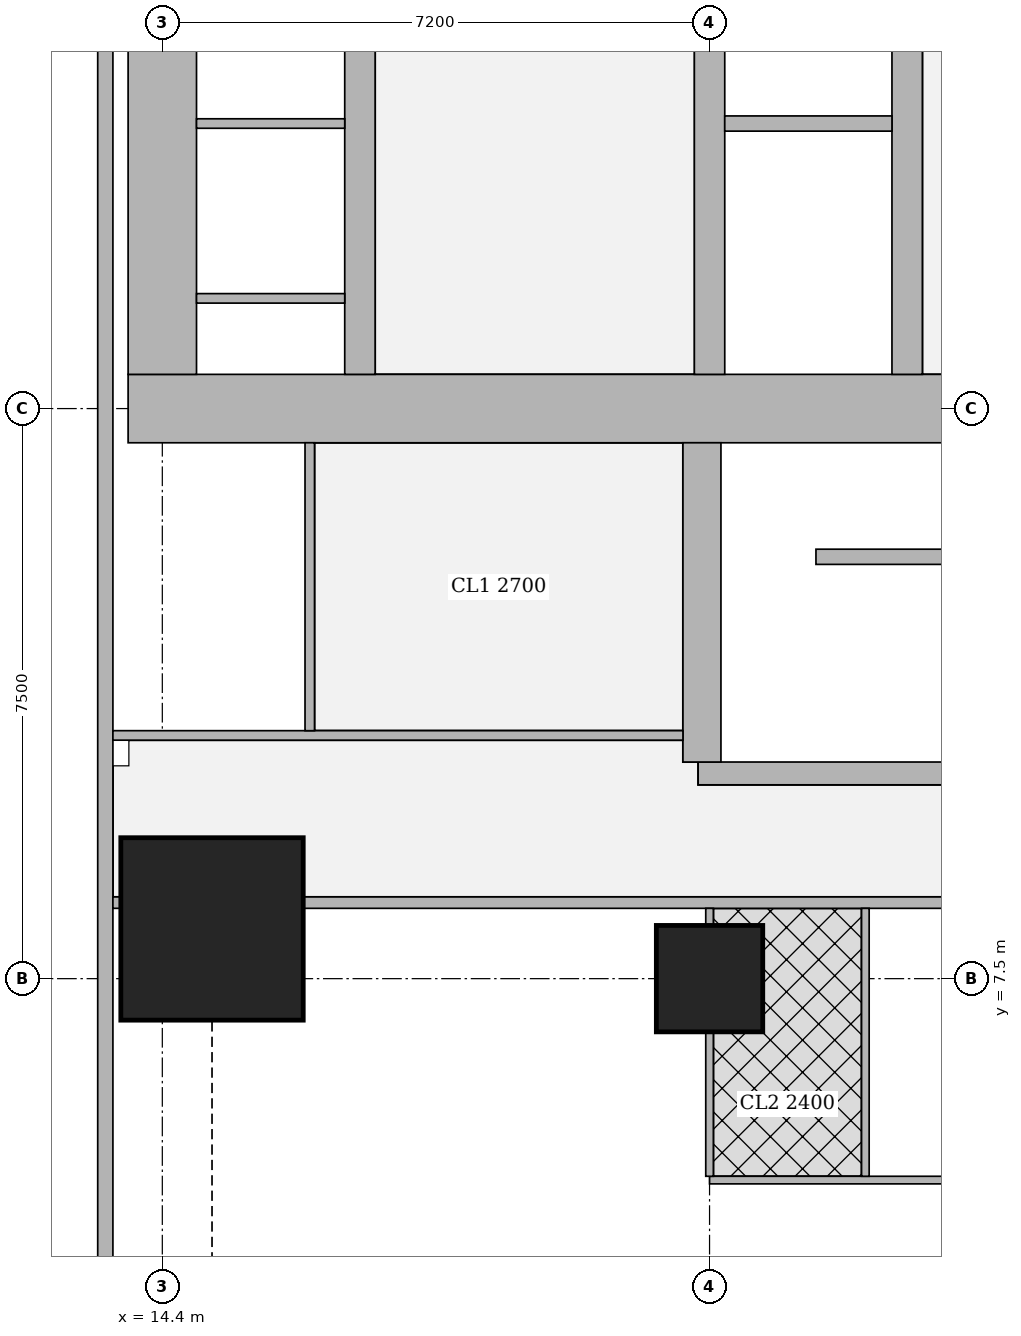
"""IFC4 building model, lengths in metres.
Left out: names, types, materials, properties, quantities, classifications, styles, units other than length and angle.
Written with IfcOpenShell. Run it as: python <this file> out.ifc"""

import sys

from ifc_helpers import new_model, si_unit, direction, frame, frame_2d, origin, origin_2d, place, context, subcontext, project, spatial, rectangle, extrude, element, fill, save


model = new_model("IFC4")
c1 = context("Model", 3, precision=1e-05, world=origin(), true_north=direction((0.0, 1.0)))
c2 = subcontext(c1, "Body", "Model", "MODEL_VIEW")
j1 = project(units=[si_unit("LENGTHUNIT", "METRE"), si_unit("PLANEANGLEUNIT", "RADIAN")], contexts=[c1])
p1 = place(None, origin())
s1 = spatial("IfcSite", under=j1, at=p1, CompositionType="ELEMENT")
p2 = place(p1, origin())
s2 = spatial("IfcBuilding", under=s1, at=p2, CompositionType="ELEMENT")
p3 = place(p2, frame((0.0, 0.0, 223.7)))
s3 = spatial("IfcBuildingStorey", under=s2, at=p3, CompositionType="ELEMENT", Elevation=223.7)
p4 = place(p3, frame((15.054, 8.154, 0.0), z_axis=(0.0, 0.0, 1.0), x_axis=(1.0, 0.0, 0.0)))
e1 = element("IfcColumn", 1, at=p4, inside=s3, PredefinedType="COLUMN", context=c2, shape_type="SweptSolid", body=[
    extrude(rectangle(XDim=2.4, YDim=2.4, at=origin_2d()), origin(), (0.0, 0.0, 1.0), 3.75),
])
p5 = place(p3, frame((21.6, 7.5, 0.0), z_axis=(0.0, 0.0, 1.0), x_axis=(1.0, 0.0, 0.0)))
e2 = element("IfcColumn", 2, at=p5, inside=s3, PredefinedType="COLUMN", context=c2, shape_type="SweptSolid", body=[
    extrude(rectangle(XDim=1.4, YDim=1.4, at=origin_2d()), origin(), (0.0, 0.0, 1.0), 3.75),
])
p6 = place(p3, frame((13.95, 15.0, 0.0), z_axis=(0.0, 0.0, 1.0), x_axis=(1.0, 0.0, 0.0)))
e3 = element("IfcWall", 3, at=p6, inside=s3, PredefinedType="SHEAR", context=c2, shape_type="SweptSolid", body=[
    extrude(rectangle(XDim=15.3, YDim=0.9, at=frame_2d((7.65, 0.0))), origin(), (0.0, 0.0, 1.0), 3.75),
])
p7 = place(p6, frame((4.45, 0.0, 0.0)))
e4 = element("IfcOpeningElement", 4, at=p7, cuts=e3, PredefinedType="OPENING", context=c2, shape_type="SweptSolid", body=[
    extrude(rectangle(XDim=1.8, YDim=2.1, at=frame_2d((0.9, 1.05))), frame((0.0, 0.46, 0.0), z_axis=(0.0, -1.0, 0.0), x_axis=(1.0, 0.0, 0.0)), (0.0, 0.0, 1.0), 0.92),
])
p8 = place(p6, frame((10.7, 0.0, 0.0)))
e5 = element("IfcOpeningElement", 5, at=p8, cuts=e3, PredefinedType="OPENING", context=c2, shape_type="SweptSolid", body=[
    extrude(rectangle(XDim=1.1, YDim=2.1, at=frame_2d((0.55, 1.05))), frame((0.0, 0.46, 0.0), z_axis=(0.0, -1.0, 0.0), x_axis=(1.0, 0.0, 0.0)), (0.0, 0.0, 1.0), 0.92),
])
p9 = place(p3, frame((14.4, 15.45, 0.0), z_axis=(0.0, 0.0, 1.0), x_axis=(0.0, 1.0, 0.0)))
e6 = element("IfcWall", 6, at=p9, inside=s3, PredefinedType="SHEAR", context=c2, shape_type="SweptSolid", body=[
    extrude(rectangle(XDim=14.1, YDim=0.9, at=frame_2d((7.05, 0.0))), origin(), (0.0, 0.0, 1.0), 3.75),
])
p10 = place(p3, frame((17.0, 15.45, 0.0), z_axis=(0.0, 0.0, 1.0), x_axis=(0.0, 1.0, 0.0)))
e7 = element("IfcWall", 7, at=p10, inside=s3, PredefinedType="SHEAR", context=c2, shape_type="SweptSolid", body=[
    extrude(rectangle(XDim=14.1, YDim=0.4, at=frame_2d((7.05, 0.0))), origin(), (0.0, 0.0, 1.0), 3.75),
])
p11 = place(p10, frame((1.05, 0.0, 0.0)))
e8 = element("IfcOpeningElement", 8, at=p11, cuts=e7, PredefinedType="OPENING", context=c2, shape_type="SweptSolid", body=[
    extrude(rectangle(XDim=1.0, YDim=2.1, at=frame_2d((0.5, 1.05))), frame((0.0, 0.21, 0.0), z_axis=(0.0, -1.0, 0.0), x_axis=(1.0, 0.0, 0.0)), (0.0, 0.0, 1.0), 0.42),
])
p12 = place(p10, frame((4.675, 0.0, 0.0)))
e9 = element("IfcOpeningElement", 9, at=p12, cuts=e7, PredefinedType="OPENING", context=c2, shape_type="SweptSolid", body=[
    extrude(rectangle(XDim=1.0, YDim=2.1, at=frame_2d((0.5, 1.05))), frame((0.0, 0.21, 0.0), z_axis=(0.0, -1.0, 0.0), x_axis=(1.0, 0.0, 0.0)), (0.0, 0.0, 1.0), 0.42),
])
p13 = place(p10, frame((8.425, 0.0, 0.0)))
e10 = element("IfcOpeningElement", 10, at=p13, cuts=e7, PredefinedType="OPENING", context=c2, shape_type="SweptSolid", body=[
    extrude(rectangle(XDim=1.0, YDim=2.1, at=frame_2d((0.5, 1.05))), frame((0.0, 0.21, 0.0), z_axis=(0.0, -1.0, 0.0), x_axis=(1.0, 0.0, 0.0)), (0.0, 0.0, 1.0), 0.42),
])
p14 = place(p10, frame((12.175, 0.0, 0.0)))
e11 = element("IfcOpeningElement", 11, at=p14, cuts=e7, PredefinedType="OPENING", context=c2, shape_type="SweptSolid", body=[
    extrude(rectangle(XDim=1.0, YDim=2.1, at=frame_2d((0.5, 1.05))), frame((0.0, 0.21, 0.0), z_axis=(0.0, -1.0, 0.0), x_axis=(1.0, 0.0, 0.0)), (0.0, 0.0, 1.0), 0.42),
])
p15 = place(p3, frame((21.6, 15.45, 0.0), z_axis=(0.0, 0.0, 1.0), x_axis=(0.0, 1.0, 0.0)))
e12 = element("IfcWall", 12, at=p15, inside=s3, PredefinedType="SHEAR", context=c2, shape_type="SweptSolid", body=[
    extrude(rectangle(XDim=14.1, YDim=0.4, at=frame_2d((7.05, 0.0))), origin(), (0.0, 0.0, 1.0), 3.75),
])
p16 = place(p15, frame((0.875, 0.0, 0.0)))
e13 = element("IfcOpeningElement", 13, at=p16, cuts=e12, PredefinedType="OPENING", context=c2, shape_type="SweptSolid", body=[
    extrude(rectangle(XDim=1.1, YDim=2.1, at=frame_2d((0.55, 1.05))), frame((0.0, 0.21, 0.0), z_axis=(0.0, -1.0, 0.0), x_axis=(1.0, 0.0, 0.0)), (0.0, 0.0, 1.0), 0.42),
])
p17 = place(p15, frame((4.625, 0.0, 0.0)))
e14 = element("IfcOpeningElement", 14, at=p17, cuts=e12, PredefinedType="OPENING", context=c2, shape_type="SweptSolid", body=[
    extrude(rectangle(XDim=1.1, YDim=2.1, at=frame_2d((0.55, 1.05))), frame((0.0, 0.21, 0.0), z_axis=(0.0, -1.0, 0.0), x_axis=(1.0, 0.0, 0.0)), (0.0, 0.0, 1.0), 0.42),
])
p18 = place(p15, frame((8.375, 0.0, 0.0)))
e15 = element("IfcOpeningElement", 15, at=p18, cuts=e12, PredefinedType="OPENING", context=c2, shape_type="SweptSolid", body=[
    extrude(rectangle(XDim=1.1, YDim=2.1, at=frame_2d((0.55, 1.05))), frame((0.0, 0.21, 0.0), z_axis=(0.0, -1.0, 0.0), x_axis=(1.0, 0.0, 0.0)), (0.0, 0.0, 1.0), 0.42),
])
p19 = place(p15, frame((12.125, 0.0, 0.0)))
e16 = element("IfcOpeningElement", 16, at=p19, cuts=e12, PredefinedType="OPENING", context=c2, shape_type="SweptSolid", body=[
    extrude(rectangle(XDim=1.1, YDim=2.1, at=frame_2d((0.55, 1.05))), frame((0.0, 0.21, 0.0), z_axis=(0.0, -1.0, 0.0), x_axis=(1.0, 0.0, 0.0)), (0.0, 0.0, 1.0), 0.42),
])
p20 = place(p3, frame((24.2, 15.45, 0.0), z_axis=(0.0, 0.0, 1.0), x_axis=(0.0, 1.0, 0.0)))
e17 = element("IfcWall", 17, at=p20, inside=s3, PredefinedType="SHEAR", context=c2, shape_type="SweptSolid", body=[
    extrude(rectangle(XDim=14.1, YDim=0.4, at=frame_2d((7.05, 0.0))), origin(), (0.0, 0.0, 1.0), 3.75),
])
p21 = place(p3, frame((21.45, 10.2, 0.0), z_axis=(0.0, 0.0, 1.0), x_axis=(1.0, 0.0, 0.0)))
e18 = element("IfcWall", 18, at=p21, inside=s3, PredefinedType="SHEAR", context=c2, shape_type="SweptSolid", body=[
    extrude(rectangle(XDim=7.5, YDim=0.3, at=frame_2d((3.75, 0.0))), origin(), (0.0, 0.0, 1.0), 3.75),
])
p22 = place(p21, frame((0.5, 0.0, 0.0)))
e19 = element("IfcOpeningElement", 19, at=p22, cuts=e18, PredefinedType="OPENING", context=c2, shape_type="SweptSolid", body=[
    extrude(rectangle(XDim=1.1, YDim=2.1, at=frame_2d((0.55, 1.05))), frame((0.0, 0.16, 0.0), z_axis=(0.0, -1.0, 0.0), x_axis=(1.0, 0.0, 0.0)), (0.0, 0.0, 1.0), 0.32),
])
p23 = place(p3, frame((21.5, 10.35, 0.0), z_axis=(0.0, 0.0, 1.0), x_axis=(0.0, 1.0, 0.0)))
e20 = element("IfcWall", 20, at=p23, inside=s3, PredefinedType="SHEAR", context=c2, shape_type="SweptSolid", body=[
    extrude(rectangle(XDim=4.2, YDim=0.5, at=frame_2d((2.1, 0.0))), origin(), (0.0, 0.0, 1.0), 3.75),
])
p24 = place(p3, frame((13.65, 44.837, 0.0), z_axis=(0.0, 0.0, 1.0), x_axis=(0.0, -1.0, 0.0)))
e21 = element("IfcWall", 21, at=p24, inside=s3, PredefinedType="SOLIDWALL", context=c2, shape_type="SweptSolid", body=[
    extrude(rectangle(XDim=44.674, YDim=0.2, at=frame_2d((22.337, 0.0))), origin(), (0.0, 0.0, 1.0), 3.5),
])
p25 = place(p24, frame((2.614, 0.0, 0.9)))
e22 = element("IfcOpeningElement", 22, at=p25, cuts=e21, PredefinedType="OPENING", context=c2, shape_type="SweptSolid", body=[
    extrude(rectangle(XDim=2.4, YDim=1.5, at=frame_2d((1.2, 0.75))), frame((0.0, 0.11, 0.0), z_axis=(0.0, -1.0, 0.0), x_axis=(1.0, 0.0, 0.0)), (0.0, 0.0, 1.0), 0.22),
])
p26 = place(p24, frame((39.333, 0.0, 0.9)))
e23 = element("IfcOpeningElement", 23, at=p26, cuts=e21, PredefinedType="OPENING", context=c2, shape_type="SweptSolid", body=[
    extrude(rectangle(XDim=2.4, YDim=1.5, at=frame_2d((1.2, 0.75))), frame((0.0, 0.11, 0.0), z_axis=(0.0, -1.0, 0.0), x_axis=(1.0, 0.0, 0.0)), (0.0, 0.0, 1.0), 0.22),
])
p27 = place(p24, frame((33.087, 0.0, 0.0)))
e24 = element("IfcOpeningElement", 24, at=p27, cuts=e21, PredefinedType="OPENING", context=c2, shape_type="SweptSolid", body=[
    extrude(rectangle(XDim=1.0, YDim=2.4, at=frame_2d((0.5, 1.2))), frame((0.0, 0.11, 0.0), z_axis=(0.0, -1.0, 0.0), x_axis=(1.0, 0.0, 0.0)), (0.0, 0.0, 1.0), 0.22),
])
p28 = place(p24, frame((10.587, 0.0, 0.0)))
e25 = element("IfcOpeningElement", 25, at=p28, cuts=e21, PredefinedType="OPENING", context=c2, shape_type="SweptSolid", body=[
    extrude(rectangle(XDim=1.0, YDim=2.4, at=frame_2d((0.5, 1.2))), frame((0.0, 0.11, 0.0), z_axis=(0.0, -1.0, 0.0), x_axis=(1.0, 0.0, 0.0)), (0.0, 0.0, 1.0), 0.22),
])
p29 = place(p3, frame((40.053, 8.5, 0.0), z_axis=(0.0, 0.0, 1.0), x_axis=(-1.0, 0.0, 0.0)))
e26 = element("IfcWall", 26, at=p29, inside=s3, PredefinedType="SOLIDWALL", context=c2, shape_type="SweptSolid", body=[
    extrude(rectangle(XDim=23.798, YDim=0.15, at=frame_2d((11.899, 0.0))), origin(), (0.0, 0.0, 1.0), 3.5),
])
p30 = place(p29, frame((21.978, 0.0, 0.0)))
e27 = element("IfcOpeningElement", 27, at=p30, cuts=e26, PredefinedType="OPENING", context=c2, shape_type="SweptSolid", body=[
    extrude(rectangle(XDim=1.0, YDim=2.1, at=frame_2d((0.5, 1.05))), frame((0.0, 0.085, 0.0), z_axis=(0.0, -1.0, 0.0), x_axis=(1.0, 0.0, 0.0)), (0.0, 0.0, 1.0), 0.17),
])
p31 = place(p29, frame((12.753, 0.0, 0.0)))
e28 = element("IfcOpeningElement", 28, at=p31, cuts=e26, PredefinedType="OPENING", context=c2, shape_type="SweptSolid", body=[
    extrude(rectangle(XDim=1.0, YDim=2.1, at=frame_2d((0.5, 1.05))), frame((0.0, 0.085, 0.0), z_axis=(0.0, -1.0, 0.0), x_axis=(1.0, 0.0, 0.0)), (0.0, 0.0, 1.0), 0.17),
])
p32 = place(p29, frame((0.15, 0.0, 0.0)))
e29 = element("IfcOpeningElement", 29, at=p32, cuts=e26, PredefinedType="OPENING", context=c2, shape_type="SweptSolid", body=[
    extrude(rectangle(XDim=1.0, YDim=2.1, at=frame_2d((0.5, 1.05))), frame((0.0, 0.085, 0.0), z_axis=(0.0, -1.0, 0.0), x_axis=(1.0, 0.0, 0.0)), (0.0, 0.0, 1.0), 0.17),
])
p33 = place(p3, frame((13.853, 8.5, 0.0), z_axis=(0.0, 0.0, 1.0), x_axis=(-1.0, 0.0, 0.0)))
e30 = element("IfcWall", 30, at=p33, inside=s3, PredefinedType="SOLIDWALL", context=c2, shape_type="SweptSolid", body=[
    extrude(rectangle(XDim=0.103, YDim=0.15, at=frame_2d((0.052, 0.0))), origin(), (0.0, 0.0, 1.0), 3.5),
])
p34 = place(p3, frame((25.075, 4.85, 0.0), z_axis=(0.0, 0.0, 1.0), x_axis=(-1.0, 0.0, 0.0)))
e31 = element("IfcWall", 31, at=p34, inside=s3, PredefinedType="PARTITIONING", context=c2, shape_type="SweptSolid", body=[
    extrude(rectangle(XDim=3.475, YDim=0.1, at=frame_2d((1.737, 0.0))), origin(), (0.0, 0.0, 1.0), 3.5),
])
p35 = place(p34, frame((2.0, 0.0, 0.0)))
e32 = element("IfcOpeningElement", 32, at=p35, cuts=e31, PredefinedType="OPENING", context=c2, shape_type="SweptSolid", body=[
    extrude(rectangle(XDim=0.9, YDim=2.1, at=frame_2d((0.45, 1.05))), frame((0.0, 0.06, 0.0), z_axis=(0.0, -1.0, 0.0), x_axis=(1.0, 0.0, 0.0)), (0.0, 0.0, 1.0), 0.12),
])
p36 = place(p34, frame((0.2, 0.0, 0.0)))
e33 = element("IfcOpeningElement", 33, at=p36, cuts=e31, PredefinedType="OPENING", context=c2, shape_type="SweptSolid", body=[
    extrude(rectangle(XDim=0.9, YDim=2.1, at=frame_2d((0.45, 1.05))), frame((0.0, 0.06, 0.0), z_axis=(0.0, -1.0, 0.0), x_axis=(1.0, 0.0, 0.0)), (0.0, 0.0, 1.0), 0.12),
])
p37 = place(p3, frame((21.6, 4.9, 0.0), z_axis=(0.0, 0.0, 1.0), x_axis=(0.0, 1.0, 0.0)))
e34 = element("IfcWall", 34, at=p37, inside=s3, PredefinedType="PARTITIONING", context=c2, shape_type="SweptSolid", body=[
    extrude(rectangle(XDim=1.899, YDim=0.1, at=frame_2d((0.95, 0.0))), origin(), (0.0, 0.0, 1.0), 3.5),
])
p38 = place(p3, frame((21.6, 8.201, 0.0), z_axis=(0.0, 0.0, 1.0), x_axis=(0.0, 1.0, 0.0)))
e35 = element("IfcWall", 35, at=p38, inside=s3, PredefinedType="PARTITIONING", context=c2, shape_type="SweptSolid", body=[
    extrude(rectangle(XDim=0.224, YDim=0.1, at=frame_2d((0.112, 0.0))), origin(), (0.0, 0.0, 1.0), 3.5),
])
p39 = place(p3, frame((23.65, 4.9, 0.0), z_axis=(0.0, 0.0, 1.0), x_axis=(0.0, 1.0, 0.0)))
e36 = element("IfcWall", 36, at=p39, inside=s3, PredefinedType="PARTITIONING", context=c2, shape_type="SweptSolid", body=[
    extrude(rectangle(XDim=3.525, YDim=0.1, at=frame_2d((1.763, 0.0))), origin(), (0.0, 0.0, 1.0), 3.5),
])
p40 = place(p3, frame((13.75, 10.7, 0.0), z_axis=(0.0, 0.0, 1.0), x_axis=(1.0, 0.0, 0.0)))
e37 = element("IfcWall", 37, at=p40, inside=s3, PredefinedType="PARTITIONING", context=c2, shape_type="SweptSolid", body=[
    extrude(rectangle(XDim=7.5, YDim=0.125, at=frame_2d((3.75, 0.0))), origin(), (0.0, 0.0, 1.0), 3.5),
])
p41 = place(p40, frame((4.245, 0.0, 0.0)))
e38 = element("IfcOpeningElement", 38, at=p41, cuts=e37, PredefinedType="OPENING", context=c2, shape_type="SweptSolid", body=[
    extrude(rectangle(XDim=1.8, YDim=2.1, at=frame_2d((0.9, 1.05))), frame((0.0, 0.073, 0.0), z_axis=(0.0, -1.0, 0.0), x_axis=(1.0, 0.0, 0.0)), (0.0, 0.0, 1.0), 0.145),
])
p42 = place(p3, frame((16.34, 10.762, 0.0), z_axis=(0.0, 0.0, 1.0), x_axis=(0.0, 1.0, 0.0)))
e39 = element("IfcWall", 39, at=p42, inside=s3, PredefinedType="PARTITIONING", context=c2, shape_type="SweptSolid", body=[
    extrude(rectangle(XDim=3.788, YDim=0.125, at=frame_2d((1.894, 0.0))), origin(), (0.0, 0.0, 1.0), 3.5),
])
p43 = place(p42, frame((1.338, 0.0, 0.0)))
e40 = element("IfcOpeningElement", 40, at=p43, cuts=e39, PredefinedType="OPENING", context=c2, shape_type="SweptSolid", body=[
    extrude(rectangle(XDim=1.0, YDim=2.1, at=frame_2d((0.5, 1.05))), frame((0.0, 0.073, 0.0), z_axis=(0.0, -1.0, 0.0), x_axis=(1.0, 0.0, 0.0)), (0.0, 0.0, 1.0), 0.145),
])
p44 = place(p3, frame((14.85, 16.45, 0.0), z_axis=(0.0, 0.0, 1.0), x_axis=(1.0, 0.0, 0.0)))
e41 = element("IfcWall", 41, at=p44, inside=s3, PredefinedType="PARTITIONING", context=c2, shape_type="SweptSolid", body=[
    extrude(rectangle(XDim=1.95, YDim=0.125, at=frame_2d((0.975, 0.0))), origin(), (0.0, 0.0, 1.0), 3.5),
])
p45 = place(p44, frame((0.2, 0.0, 0.0)))
e42 = element("IfcOpeningElement", 42, at=p45, cuts=e41, PredefinedType="OPENING", context=c2, shape_type="SweptSolid", body=[
    extrude(rectangle(XDim=1.0, YDim=2.1, at=frame_2d((0.5, 1.05))), frame((0.0, 0.073, 0.0), z_axis=(0.0, -1.0, 0.0), x_axis=(1.0, 0.0, 0.0)), (0.0, 0.0, 1.0), 0.145),
])
p46 = place(p3, frame((14.85, 18.75, 0.0), z_axis=(0.0, 0.0, 1.0), x_axis=(1.0, 0.0, 0.0)))
e43 = element("IfcWall", 43, at=p46, inside=s3, PredefinedType="PARTITIONING", context=c2, shape_type="SweptSolid", body=[
    extrude(rectangle(XDim=1.95, YDim=0.125, at=frame_2d((0.975, 0.0))), origin(), (0.0, 0.0, 1.0), 3.5),
])
p47 = place(p3, frame((23.0, 13.05, 0.0), z_axis=(0.0, 0.0, 1.0), x_axis=(1.0, 0.0, 0.0)))
e44 = element("IfcWall", 44, at=p47, inside=s3, PredefinedType="SHEAR", context=c2, shape_type="SweptSolid", body=[
    extrude(rectangle(XDim=5.8, YDim=0.2, at=frame_2d((2.9, 0.0))), origin(), (0.0, 0.0, 1.0), 3.75),
])
p48 = place(p3, frame((21.8, 18.75, 0.0), z_axis=(0.0, 0.0, 1.0), x_axis=(1.0, 0.0, 0.0)))
e45 = element("IfcWall", 45, at=p48, inside=s3, PredefinedType="SOLIDWALL", context=c2, shape_type="SweptSolid", body=[
    extrude(rectangle(XDim=2.2, YDim=0.2, at=frame_2d((1.1, 0.0))), origin(), (0.0, 0.0, 1.0), 3.5),
])
p49 = place(p26, origin())
e46 = element("IfcWindow", 46, at=p49, inside=s3, PartitioningType="SINGLE_PANEL", PredefinedType="WINDOW", context=c2, shape_type="SweptSolid", body=[
    extrude(rectangle(XDim=2.4, YDim=1.5, at=frame_2d((1.2, 0.75))), frame((0.0, 0.03, 0.0), z_axis=(0.0, -1.0, 0.0), x_axis=(1.0, 0.0, 0.0)), (0.0, 0.0, 1.0), 0.06),
])
fill(e23, e46)
p50 = place(p27, origin())
e47 = element("IfcDoor", 47, at=p50, inside=s3, OperationType="SINGLE_SWING_RIGHT", PredefinedType="DOOR", context=c2, shape_type="SweptSolid", body=[
    extrude(rectangle(XDim=1.0, YDim=2.4, at=frame_2d((0.5, 1.2))), frame((0.0, 0.025, 0.0), z_axis=(0.0, -1.0, 0.0), x_axis=(1.0, 0.0, 0.0)), (0.0, 0.0, 1.0), 0.05),
])
fill(e24, e47)
p51 = place(p35, origin())
e48 = element("IfcDoor", 48, at=p51, inside=s3, OperationType="SINGLE_SWING_LEFT", PredefinedType="DOOR", context=c2, shape_type="SweptSolid", body=[
    extrude(rectangle(XDim=0.9, YDim=2.1, at=frame_2d((0.45, 1.05))), frame((0.0, 0.025, 0.0), z_axis=(0.0, -1.0, 0.0), x_axis=(1.0, 0.0, 0.0)), (0.0, 0.0, 1.0), 0.05),
])
fill(e32, e48)
p52 = place(p36, origin())
e49 = element("IfcDoor", 49, at=p52, inside=s3, OperationType="SINGLE_SWING_RIGHT", PredefinedType="DOOR", context=c2, shape_type="SweptSolid", body=[
    extrude(rectangle(XDim=0.9, YDim=2.1, at=frame_2d((0.45, 1.05))), frame((0.0, 0.025, 0.0), z_axis=(0.0, -1.0, 0.0), x_axis=(1.0, 0.0, 0.0)), (0.0, 0.0, 1.0), 0.05),
])
fill(e33, e49)
p53 = place(p30, origin())
e50 = element("IfcDoor", 50, at=p53, inside=s3, OperationType="SINGLE_SWING_RIGHT", PredefinedType="DOOR", context=c2, shape_type="SweptSolid", body=[
    extrude(rectangle(XDim=1.0, YDim=2.1, at=frame_2d((0.5, 1.05))), frame((0.0, 0.025, 0.0), z_axis=(0.0, -1.0, 0.0), x_axis=(1.0, 0.0, 0.0)), (0.0, 0.0, 1.0), 0.05),
])
fill(e27, e50)
p54 = place(p43, origin())
e51 = element("IfcDoor", 51, at=p54, inside=s3, OperationType="SINGLE_SWING_LEFT", PredefinedType="DOOR", context=c2, shape_type="SweptSolid", body=[
    extrude(rectangle(XDim=1.0, YDim=2.1, at=frame_2d((0.5, 1.05))), frame((0.0, 0.025, 0.0), z_axis=(0.0, -1.0, 0.0), x_axis=(1.0, 0.0, 0.0)), (0.0, 0.0, 1.0), 0.05),
])
fill(e40, e51)
p55 = place(p41, origin())
e52 = element("IfcDoor", 52, at=p55, inside=s3, OperationType="DOUBLE_DOOR_SINGLE_SWING", PredefinedType="DOOR", context=c2, shape_type="SweptSolid", body=[
    extrude(rectangle(XDim=1.8, YDim=2.1, at=frame_2d((0.9, 1.05))), frame((0.0, 0.025, 0.0), z_axis=(0.0, -1.0, 0.0), x_axis=(1.0, 0.0, 0.0)), (0.0, 0.0, 1.0), 0.05),
])
fill(e38, e52)
p56 = place(p45, origin())
e53 = element("IfcDoor", 53, at=p56, inside=s3, OperationType="SINGLE_SWING_RIGHT", PredefinedType="DOOR", context=c2, shape_type="SweptSolid", body=[
    extrude(rectangle(XDim=1.0, YDim=2.1, at=frame_2d((0.5, 1.05))), frame((0.0, 0.025, 0.0), z_axis=(0.0, -1.0, 0.0), x_axis=(1.0, 0.0, 0.0)), (0.0, 0.0, 1.0), 0.05),
])
fill(e42, e53)
p57 = place(p11, origin())
e54 = element("IfcDoor", 54, at=p57, inside=s3, OperationType="SINGLE_SWING_LEFT", PredefinedType="DOOR", context=c2, shape_type="SweptSolid", body=[
    extrude(rectangle(XDim=1.0, YDim=2.1, at=frame_2d((0.5, 1.05))), frame((0.0, 0.025, 0.0), z_axis=(0.0, -1.0, 0.0), x_axis=(1.0, 0.0, 0.0)), (0.0, 0.0, 1.0), 0.05),
])
fill(e8, e54)
p58 = place(p7, origin())
e55 = element("IfcDoor", 55, at=p58, inside=s3, OperationType="DOUBLE_DOOR_SINGLE_SWING", PredefinedType="DOOR", context=c2, shape_type="SweptSolid", body=[
    extrude(rectangle(XDim=1.8, YDim=2.1, at=frame_2d((0.9, 1.05))), frame((0.0, 0.025, 0.0), z_axis=(0.0, -1.0, 0.0), x_axis=(1.0, 0.0, 0.0)), (0.0, 0.0, 1.0), 0.05),
])
fill(e4, e55)
p59 = place(p16, origin())
e56 = element("IfcDoor", 56, at=p59, inside=s3, OperationType="DOUBLE_DOOR_SLIDING", PredefinedType="DOOR", context=c2, shape_type="SweptSolid", body=[
    extrude(rectangle(XDim=1.1, YDim=2.1, at=frame_2d((0.55, 1.05))), frame((0.0, 0.025, 0.0), z_axis=(0.0, -1.0, 0.0), x_axis=(1.0, 0.0, 0.0)), (0.0, 0.0, 1.0), 0.05),
])
fill(e13, e56)
p60 = place(p22, origin())
e57 = element("IfcDoor", 57, at=p60, inside=s3, OperationType="SINGLE_SWING_LEFT", PredefinedType="DOOR", context=c2, shape_type="SweptSolid", body=[
    extrude(rectangle(XDim=1.1, YDim=2.1, at=frame_2d((0.55, 1.05))), frame((0.0, 0.025, 0.0), z_axis=(0.0, -1.0, 0.0), x_axis=(1.0, 0.0, 0.0)), (0.0, 0.0, 1.0), 0.05),
])
fill(e19, e57)
save(model, sys.argv[1])
